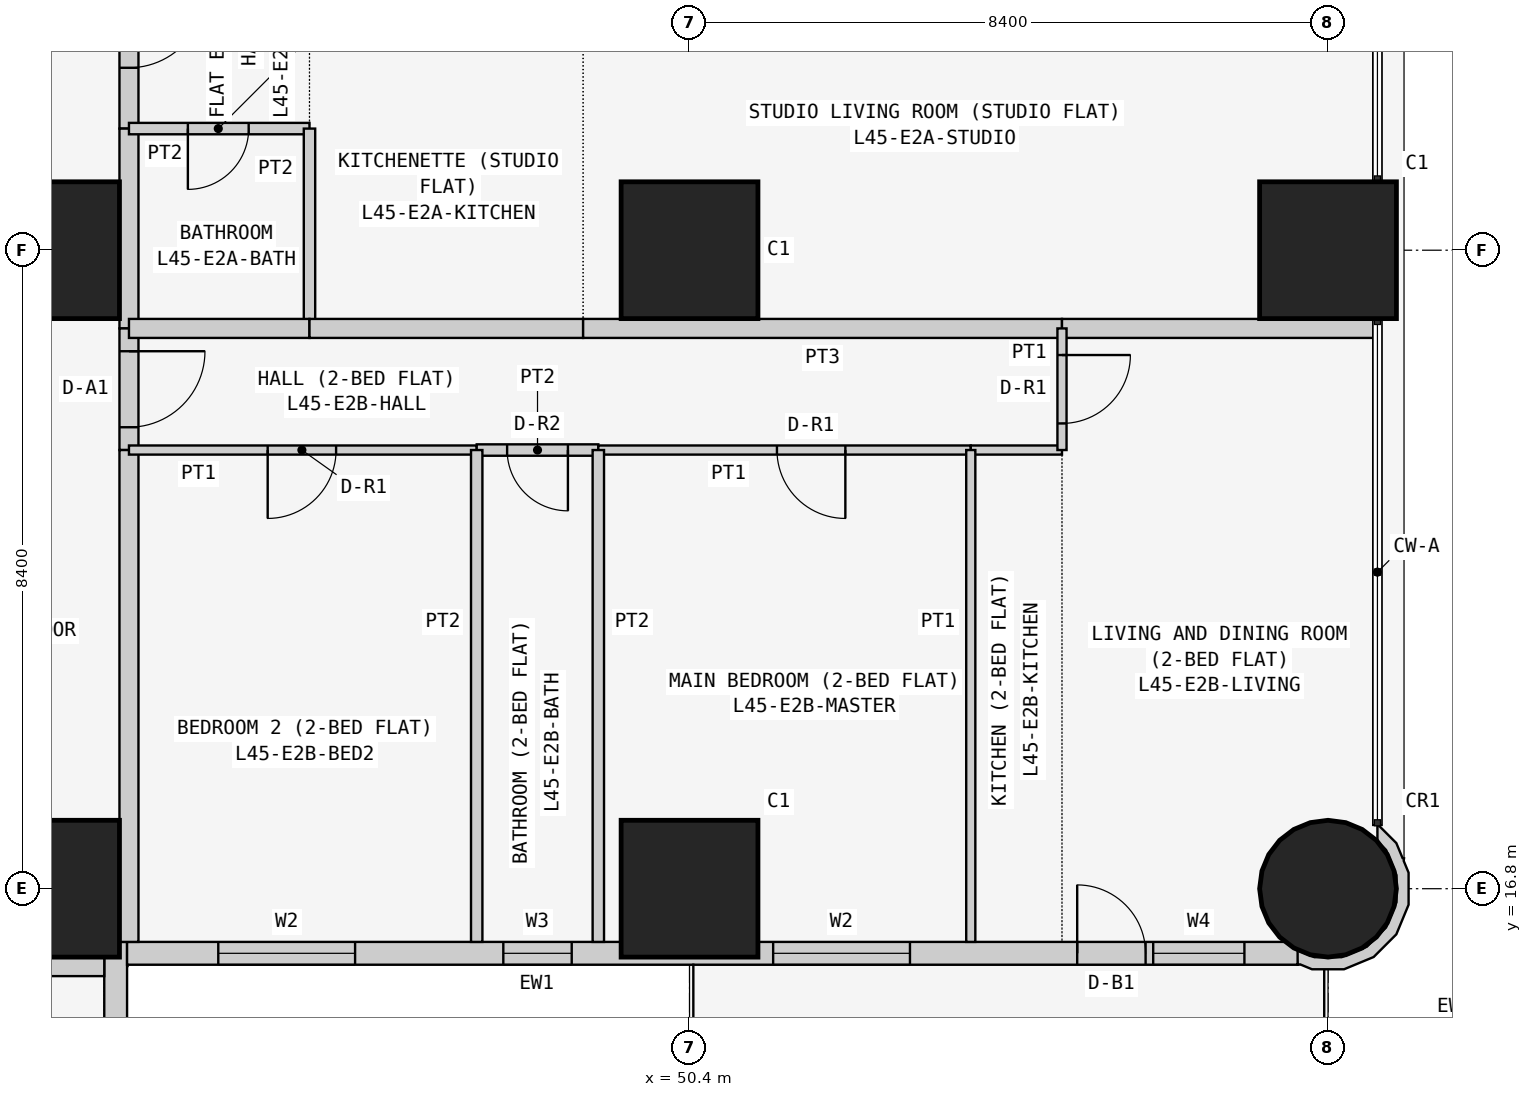
"""IFC4 building model, lengths in metres.
Left out: names, types, materials, properties, quantities, classifications, styles, units other than length and angle.
Written with IfcOpenShell. Run it as: python <this file> out.ifc"""

import sys

from ifc_helpers import new_model, si_unit, direction, frame, frame_2d, origin, origin_2d, place, context, subcontext, project, spatial, polyline, rectangle, circle, outline, extrude, element, fill, save


model = new_model("IFC4")
c1 = context("Model", 3, precision=1e-05, world=origin(), true_north=direction((0.0, 1.0)))
c2 = subcontext(c1, "Body", "Model", "MODEL_VIEW")
j1 = project(units=[si_unit("LENGTHUNIT", "METRE"), si_unit("PLANEANGLEUNIT", "RADIAN")], contexts=[c1])
p1 = place(None, origin())
s1 = spatial("IfcSite", under=j1, at=p1, CompositionType="ELEMENT")
p2 = place(p1, origin())
s2 = spatial("IfcBuilding", under=s1, at=p2, CompositionType="ELEMENT")
p3 = place(p2, frame((0.0, 0.0, 173.7)))
s3 = spatial("IfcBuildingStorey", under=s2, at=p3, CompositionType="ELEMENT", Elevation=173.7)
for number, where, z_axis, x_axis in (
    (1, (42.0, 16.8, 0.0), (0.0, 0.0, 1.0), (1.0, 0.0, 0.0)),
    (2, (42.0, 25.2, 0.0), (0.0, 0.0, 1.0), (1.0, 0.0, 0.0)),
    (3, (50.4, 16.8, 0.0), (0.0, 0.0, 1.0), (1.0, 0.0, 0.0)),
    (4, (50.4, 25.2, 0.0), (0.0, 0.0, 1.0), (1.0, 0.0, 0.0)),
):
    element("IfcColumn", number, at=place(p3, frame(where, z_axis=z_axis, x_axis=x_axis)), inside=s3, PredefinedType="COLUMN", context=c2, shape_type="SweptSolid", body=[
        extrude(rectangle(XDim=1.8, YDim=1.8, at=origin_2d()), origin(), (0.0, 0.0, 1.0), 3.6),
    ])
p4 = place(p3, frame((58.8, 16.8, 0.0), z_axis=(0.0, 0.0, 1.0), x_axis=(1.0, 0.0, 0.0)))
e5 = element("IfcColumn", 5, at=p4, inside=s3, PredefinedType="COLUMN", context=c2, shape_type="SweptSolid", body=[
    extrude(circle(Radius=0.9, at=origin_2d()), origin(), (0.0, 0.0, 1.0), 3.6),
])
p5 = place(p3, frame((58.8, 25.2, 0.0), z_axis=(0.0, 0.0, 1.0), x_axis=(1.0, 0.0, 0.0)))
e6 = element("IfcColumn", 6, at=p5, inside=s3, PredefinedType="COLUMN", context=c2, shape_type="SweptSolid", body=[
    extrude(rectangle(XDim=1.8, YDim=1.8, at=origin_2d()), origin(), (0.0, 0.0, 1.0), 3.6),
])
p6 = place(p3, frame((42.85, 8.8, 0.0), z_axis=(0.0, 0.0, 1.0), x_axis=(0.0, 1.0, 0.0)))
e7 = element("IfcWall", 7, at=p6, inside=s3, PredefinedType="SOLIDWALL", context=c2, shape_type="SweptSolid", body=[
    extrude(rectangle(XDim=7.3, YDim=0.3, at=frame_2d((3.65, 0.0))), origin(), (0.0, 0.0, 1.0), 3.35),
])
p7 = place(p6, frame((3.1, 0.0, 0.9)))
e8 = element("IfcOpeningElement", 8, at=p7, cuts=e7, PredefinedType="OPENING", context=c2, shape_type="SweptSolid", body=[
    extrude(rectangle(XDim=2.4, YDim=1.5, at=frame_2d((1.2, 0.75))), frame((0.0, 0.16, 0.0), z_axis=(0.0, -1.0, 0.0), x_axis=(1.0, 0.0, 0.0)), (0.0, 0.0, 1.0), 0.32),
])
p8 = place(p6, frame((0.75, 0.0, 0.9)))
e9 = element("IfcOpeningElement", 9, at=p8, cuts=e7, PredefinedType="OPENING", context=c2, shape_type="SweptSolid", body=[
    extrude(rectangle(XDim=1.2, YDim=1.5, at=frame_2d((0.6, 0.75))), frame((0.0, 0.16, 0.0), z_axis=(0.0, -1.0, 0.0), x_axis=(1.0, 0.0, 0.0)), (0.0, 0.0, 1.0), 0.32),
])
p9 = place(p3, frame((43.0, 15.95, 0.0), z_axis=(0.0, 0.0, 1.0), x_axis=(1.0, 0.0, 0.0)))
e10 = element("IfcWall", 10, at=p9, inside=s3, PredefinedType="SOLIDWALL", context=c2, shape_type="SweptSolid", body=[
    extrude(rectangle(XDim=15.4, YDim=0.3, at=frame_2d((7.7, 0.0))), origin(), (0.0, 0.0, 1.0), 3.35),
])
p10 = place(p9, frame((1.2, 0.0, 0.9)))
e11 = element("IfcOpeningElement", 11, at=p10, cuts=e10, PredefinedType="OPENING", context=c2, shape_type="SweptSolid", body=[
    extrude(rectangle(XDim=1.8, YDim=1.5, at=frame_2d((0.9, 0.75))), frame((0.0, 0.16, 0.0), z_axis=(0.0, -1.0, 0.0), x_axis=(1.0, 0.0, 0.0)), (0.0, 0.0, 1.0), 0.32),
])
p11 = place(p9, frame((4.95, 0.0, 1.5)))
e12 = element("IfcOpeningElement", 12, at=p11, cuts=e10, PredefinedType="OPENING", context=c2, shape_type="SweptSolid", body=[
    extrude(rectangle(XDim=0.9, YDim=0.7, at=frame_2d((0.45, 0.35))), frame((0.0, 0.16, 0.0), z_axis=(0.0, -1.0, 0.0), x_axis=(1.0, 0.0, 0.0)), (0.0, 0.0, 1.0), 0.32),
])
p12 = place(p9, frame((8.5, 0.0, 0.9)))
e13 = element("IfcOpeningElement", 13, at=p12, cuts=e10, PredefinedType="OPENING", context=c2, shape_type="SweptSolid", body=[
    extrude(rectangle(XDim=1.8, YDim=1.5, at=frame_2d((0.9, 0.75))), frame((0.0, 0.16, 0.0), z_axis=(0.0, -1.0, 0.0), x_axis=(1.0, 0.0, 0.0)), (0.0, 0.0, 1.0), 0.32),
])
p13 = place(p9, frame((12.5, 0.0, 0.0)))
e14 = element("IfcOpeningElement", 14, at=p13, cuts=e10, PredefinedType="OPENING", context=c2, shape_type="SweptSolid", body=[
    extrude(rectangle(XDim=0.9, YDim=2.4, at=frame_2d((0.45, 1.2))), frame((0.0, 0.16, 0.0), z_axis=(0.0, -1.0, 0.0), x_axis=(1.0, 0.0, 0.0)), (0.0, 0.0, 1.0), 0.32),
])
p14 = place(p9, frame((13.5, 0.0, 0.9)))
e15 = element("IfcOpeningElement", 15, at=p14, cuts=e10, PredefinedType="OPENING", context=c2, shape_type="SweptSolid", body=[
    extrude(rectangle(XDim=1.2, YDim=1.5, at=frame_2d((0.6, 0.75))), frame((0.0, 0.16, 0.0), z_axis=(0.0, -1.0, 0.0), x_axis=(1.0, 0.0, 0.0)), (0.0, 0.0, 1.0), 0.32),
])
p15 = place(p3, frame((58.436, 15.89, 0.0), z_axis=(0.0, 0.0, 1.0), x_axis=(0.926129809145, -0.377204953059, 0.0)))
e16 = element("IfcWall", 16, at=p15, inside=s3, PredefinedType="SOLIDWALL", context=c2, shape_type="SweptSolid", body=[
    extrude(outline(polyline([(0.769, 1.728), (0.75, 1.723), (0.6, 1.875), (0.295, 2.004), (0.281, 1.998), (0.36, 1.803), (0.509, 1.741), (0.761, 1.486), (0.896, 1.154), (0.894, 0.795), (0.755, 0.465), (0.5, 0.213), (0.168, 0.078), (-0.1, 0.08), (0.0, -0.097), (0.03, -0.08), (0.198, -0.081), (0.589, 0.078), (0.889, 0.374), (1.052, 0.763), (1.055, 1.185), (0.896, 1.575), (0.778, 1.695), (0.769, 1.728)])), origin(), (0.0, 0.0, 1.0), 3.35),
])
p16 = place(p3, frame((43.025, 29.4, 0.0), z_axis=(0.0, 0.0, 1.0), x_axis=(0.0, -1.0, 0.0)))
e17 = element("IfcWall", 17, at=p16, inside=s3, PredefinedType="PARTITIONING", context=c2, shape_type="SweptSolid", body=[
    extrude(rectangle(XDim=2.6, YDim=0.25, at=frame_2d((1.3, 0.0))), origin(), (0.0, 0.0, 1.0), 3.35),
])
p17 = place(p16, frame((0.8, 0.0, 0.0)))
e18 = element("IfcOpeningElement", 18, at=p17, cuts=e17, PredefinedType="OPENING", context=c2, shape_type="SweptSolid", body=[
    extrude(rectangle(XDim=1.0, YDim=2.1, at=frame_2d((0.5, 1.05))), frame((0.0, 0.135, 0.0), z_axis=(0.0, -1.0, 0.0), x_axis=(1.0, 0.0, 0.0)), (0.0, 0.0, 1.0), 0.27),
])
p18 = place(p3, frame((43.025, 26.8, 0.0), z_axis=(0.0, 0.0, 1.0), x_axis=(0.0, -1.0, 0.0)))
e19 = element("IfcWall", 19, at=p18, inside=s3, PredefinedType="PARTITIONING", context=c2, shape_type="SweptSolid", body=[
    extrude(rectangle(XDim=2.629, YDim=0.25, at=frame_2d((1.314, 0.0))), origin(), (0.0, 0.0, 1.0), 3.35),
])
p19 = place(p3, frame((43.025, 24.171, 0.0), z_axis=(0.0, 0.0, 1.0), x_axis=(0.0, -1.0, 0.0)))
e20 = element("IfcWall", 20, at=p19, inside=s3, PredefinedType="PARTITIONING", context=c2, shape_type="SweptSolid", body=[
    extrude(rectangle(XDim=1.6, YDim=0.25, at=frame_2d((0.8, 0.0))), origin(), (0.0, 0.0, 1.0), 3.35),
])
p20 = place(p19, frame((0.3, 0.0, 0.0)))
e21 = element("IfcOpeningElement", 21, at=p20, cuts=e20, PredefinedType="OPENING", context=c2, shape_type="SweptSolid", body=[
    extrude(rectangle(XDim=1.0, YDim=2.1, at=frame_2d((0.5, 1.05))), frame((0.0, 0.135, 0.0), z_axis=(0.0, -1.0, 0.0), x_axis=(1.0, 0.0, 0.0)), (0.0, 0.0, 1.0), 0.27),
])
p21 = place(p3, frame((43.025, 22.571, 0.0), z_axis=(0.0, 0.0, 1.0), x_axis=(0.0, -1.0, 0.0)))
e22 = element("IfcWall", 22, at=p21, inside=s3, PredefinedType="PARTITIONING", context=c2, shape_type="SweptSolid", body=[
    extrude(rectangle(XDim=6.471, YDim=0.25, at=frame_2d((3.235, 0.0))), origin(), (0.0, 0.0, 1.0), 3.35),
])
p22 = place(p3, frame((42.7, 15.775, 0.0), z_axis=(0.0, 0.0, 1.0), x_axis=(-1.0, 0.0, 0.0)))
e23 = element("IfcWall", 23, at=p22, inside=s3, PredefinedType="PARTITIONING", context=c2, shape_type="SweptSolid", body=[
    extrude(rectangle(XDim=6.871, YDim=0.25, at=frame_2d((3.436, 0.0))), origin(), (0.0, 0.0, 1.0), 3.35),
])
p23 = place(p3, frame((45.4, 26.8, 0.0), z_axis=(0.0, 0.0, 1.0), x_axis=(-1.0, 0.0, 0.0)))
e24 = element("IfcWall", 24, at=p23, inside=s3, PredefinedType="PARTITIONING", context=c2, shape_type="SweptSolid", body=[
    extrude(rectangle(XDim=2.375, YDim=0.15, at=frame_2d((1.188, 0.0))), origin(), (0.0, 0.0, 1.0), 3.35),
])
p24 = place(p23, frame((0.8, 0.0, 0.0)))
e25 = element("IfcOpeningElement", 25, at=p24, cuts=e24, PredefinedType="OPENING", context=c2, shape_type="SweptSolid", body=[
    extrude(rectangle(XDim=0.8, YDim=2.1, at=frame_2d((0.4, 1.05))), frame((0.0, 0.085, 0.0), z_axis=(0.0, -1.0, 0.0), x_axis=(1.0, 0.0, 0.0)), (0.0, 0.0, 1.0), 0.17),
])
p25 = place(p3, frame((45.4, 26.8, 0.0), z_axis=(0.0, 0.0, 1.0), x_axis=(0.0, -1.0, 0.0)))
e26 = element("IfcWall", 26, at=p25, inside=s3, PredefinedType="PARTITIONING", context=c2, shape_type="SweptSolid", body=[
    extrude(rectangle(XDim=2.629, YDim=0.15, at=frame_2d((1.314, 0.0))), origin(), (0.0, 0.0, 1.0), 3.35),
])
p26 = place(p3, frame((45.4, 24.171, 0.0), z_axis=(0.0, 0.0, 1.0), x_axis=(-1.0, 0.0, 0.0)))
e27 = element("IfcWall", 27, at=p26, inside=s3, PredefinedType="PARTITIONING", context=c2, shape_type="SweptSolid", body=[
    extrude(rectangle(XDim=2.375, YDim=0.25, at=frame_2d((1.188, 0.0))), origin(), (0.0, 0.0, 1.0), 3.35),
])
p27 = place(p3, frame((49.0, 24.171, 0.0), z_axis=(0.0, 0.0, 1.0), x_axis=(-1.0, 0.0, 0.0)))
e28 = element("IfcWall", 28, at=p27, inside=s3, PredefinedType="PARTITIONING", context=c2, shape_type="SweptSolid", body=[
    extrude(rectangle(XDim=3.6, YDim=0.25, at=frame_2d((1.8, 0.0))), origin(), (0.0, 0.0, 1.0), 3.35),
])
p28 = place(p3, frame((55.3, 24.171, 0.0), z_axis=(0.0, 0.0, 1.0), x_axis=(-1.0, 0.0, 0.0)))
e29 = element("IfcWall", 29, at=p28, inside=s3, PredefinedType="PARTITIONING", context=c2, shape_type="SweptSolid", body=[
    extrude(rectangle(XDim=6.3, YDim=0.25, at=frame_2d((3.15, 0.0))), origin(), (0.0, 0.0, 1.0), 3.35),
])
p29 = place(p3, frame((59.45, 24.171, 0.0), z_axis=(0.0, 0.0, 1.0), x_axis=(-1.0, 0.0, 0.0)))
e30 = element("IfcWall", 30, at=p29, inside=s3, PredefinedType="PARTITIONING", context=c2, shape_type="SweptSolid", body=[
    extrude(rectangle(XDim=4.15, YDim=0.25, at=frame_2d((2.075, 0.0))), origin(), (0.0, 0.0, 1.0), 3.35),
])
p30 = place(p3, frame((47.6, 22.571, 0.0), z_axis=(0.0, 0.0, 1.0), x_axis=(-1.0, 0.0, 0.0)))
e31 = element("IfcWall", 31, at=p30, inside=s3, PredefinedType="PARTITIONING", context=c2, shape_type="SweptSolid", body=[
    extrude(rectangle(XDim=4.575, YDim=0.12, at=frame_2d((2.288, 0.0))), origin(), (0.0, 0.0, 1.0), 3.35),
])
p31 = place(p30, frame((1.85, 0.0, 0.0)))
e32 = element("IfcOpeningElement", 32, at=p31, cuts=e31, PredefinedType="OPENING", context=c2, shape_type="SweptSolid", body=[
    extrude(rectangle(XDim=0.9, YDim=2.1, at=frame_2d((0.45, 1.05))), frame((0.0, 0.07, 0.0), z_axis=(0.0, -1.0, 0.0), x_axis=(1.0, 0.0, 0.0)), (0.0, 0.0, 1.0), 0.14),
])
p32 = place(p3, frame((49.2, 22.571, 0.0), z_axis=(0.0, 0.0, 1.0), x_axis=(-1.0, 0.0, 0.0)))
e33 = element("IfcWall", 33, at=p32, inside=s3, PredefinedType="PARTITIONING", context=c2, shape_type="SweptSolid", body=[
    extrude(rectangle(XDim=1.6, YDim=0.15, at=frame_2d((0.8, 0.0))), origin(), (0.0, 0.0, 1.0), 3.35),
])
p33 = place(p32, frame((0.4, 0.0, 0.0)))
e34 = element("IfcOpeningElement", 34, at=p33, cuts=e33, PredefinedType="OPENING", context=c2, shape_type="SweptSolid", body=[
    extrude(rectangle(XDim=0.8, YDim=2.1, at=frame_2d((0.4, 1.05))), frame((0.0, 0.085, 0.0), z_axis=(0.0, -1.0, 0.0), x_axis=(1.0, 0.0, 0.0)), (0.0, 0.0, 1.0), 0.17),
])
p34 = place(p3, frame((54.1, 22.571, 0.0), z_axis=(0.0, 0.0, 1.0), x_axis=(-1.0, 0.0, 0.0)))
e35 = element("IfcWall", 35, at=p34, inside=s3, PredefinedType="PARTITIONING", context=c2, shape_type="SweptSolid", body=[
    extrude(rectangle(XDim=4.9, YDim=0.12, at=frame_2d((2.45, 0.0))), origin(), (0.0, 0.0, 1.0), 3.35),
])
p35 = place(p34, frame((1.65, 0.0, 0.0)))
e36 = element("IfcOpeningElement", 36, at=p35, cuts=e35, PredefinedType="OPENING", context=c2, shape_type="SweptSolid", body=[
    extrude(rectangle(XDim=0.9, YDim=2.1, at=frame_2d((0.45, 1.05))), frame((0.0, 0.07, 0.0), z_axis=(0.0, -1.0, 0.0), x_axis=(1.0, 0.0, 0.0)), (0.0, 0.0, 1.0), 0.14),
])
p36 = place(p3, frame((55.3, 22.571, 0.0), z_axis=(0.0, 0.0, 1.0), x_axis=(-1.0, 0.0, 0.0)))
e37 = element("IfcWall", 37, at=p36, inside=s3, PredefinedType="PARTITIONING", context=c2, shape_type="SweptSolid", body=[
    extrude(rectangle(XDim=1.2, YDim=0.12, at=frame_2d((0.6, 0.0))), origin(), (0.0, 0.0, 1.0), 3.35),
])
p37 = place(p3, frame((55.3, 24.171, 0.0), z_axis=(0.0, 0.0, 1.0), x_axis=(0.0, -1.0, 0.0)))
e38 = element("IfcWall", 38, at=p37, inside=s3, PredefinedType="PARTITIONING", context=c2, shape_type="SweptSolid", body=[
    extrude(rectangle(XDim=1.6, YDim=0.12, at=frame_2d((0.8, 0.0))), origin(), (0.0, 0.0, 1.0), 3.35),
])
p38 = place(p37, frame((0.35, 0.0, 0.0)))
e39 = element("IfcOpeningElement", 39, at=p38, cuts=e38, PredefinedType="OPENING", context=c2, shape_type="SweptSolid", body=[
    extrude(rectangle(XDim=0.9, YDim=2.1, at=frame_2d((0.45, 1.05))), frame((0.0, 0.07, 0.0), z_axis=(0.0, -1.0, 0.0), x_axis=(1.0, 0.0, 0.0)), (0.0, 0.0, 1.0), 0.14),
])
for number, where, z_axis, x_axis in (
    (40, (47.6, 22.571, 0.0), (0.0, 0.0, 1.0), (0.0, -1.0, 0.0)),
    (41, (49.2, 22.571, 0.0), (0.0, 0.0, 1.0), (0.0, -1.0, 0.0)),
):
    element("IfcWall", number, at=place(p3, frame(where, z_axis=z_axis, x_axis=x_axis)), inside=s3, PredefinedType="PARTITIONING", context=c2, shape_type="SweptSolid", body=[
        extrude(rectangle(XDim=6.471, YDim=0.15, at=frame_2d((3.235, 0.0))), origin(), (0.0, 0.0, 1.0), 3.35),
    ])
p39 = place(p3, frame((54.1, 22.571, 0.0), z_axis=(0.0, 0.0, 1.0), x_axis=(0.0, -1.0, 0.0)))
e42 = element("IfcWall", 42, at=p39, inside=s3, PredefinedType="PARTITIONING", context=c2, shape_type="SweptSolid", body=[
    extrude(rectangle(XDim=6.471, YDim=0.12, at=frame_2d((3.235, 0.0))), origin(), (0.0, 0.0, 1.0), 3.35),
])
p40 = place(p10, origin())
e43 = element("IfcWindow", 43, at=p40, inside=s3, PartitioningType="SINGLE_PANEL", PredefinedType="WINDOW", context=c2, shape_type="SweptSolid", body=[
    extrude(rectangle(XDim=1.8, YDim=1.5, at=frame_2d((0.9, 0.75))), frame((0.0, 0.03, 0.0), z_axis=(0.0, -1.0, 0.0), x_axis=(1.0, 0.0, 0.0)), (0.0, 0.0, 1.0), 0.06),
])
fill(e11, e43)
p41 = place(p11, origin())
e44 = element("IfcWindow", 44, at=p41, inside=s3, PartitioningType="SINGLE_PANEL", PredefinedType="WINDOW", context=c2, shape_type="SweptSolid", body=[
    extrude(rectangle(XDim=0.9, YDim=0.7, at=frame_2d((0.45, 0.35))), frame((0.0, 0.03, 0.0), z_axis=(0.0, -1.0, 0.0), x_axis=(1.0, 0.0, 0.0)), (0.0, 0.0, 1.0), 0.06),
])
fill(e12, e44)
p42 = place(p12, origin())
e45 = element("IfcWindow", 45, at=p42, inside=s3, PartitioningType="SINGLE_PANEL", PredefinedType="WINDOW", context=c2, shape_type="SweptSolid", body=[
    extrude(rectangle(XDim=1.8, YDim=1.5, at=frame_2d((0.9, 0.75))), frame((0.0, 0.03, 0.0), z_axis=(0.0, -1.0, 0.0), x_axis=(1.0, 0.0, 0.0)), (0.0, 0.0, 1.0), 0.06),
])
fill(e13, e45)
p43 = place(p13, origin())
e46 = element("IfcDoor", 46, at=p43, inside=s3, OperationType="SINGLE_SWING_LEFT", PredefinedType="DOOR", context=c2, shape_type="SweptSolid", body=[
    extrude(rectangle(XDim=0.9, YDim=2.4, at=frame_2d((0.45, 1.2))), frame((0.0, 0.025, 0.0), z_axis=(0.0, -1.0, 0.0), x_axis=(1.0, 0.0, 0.0)), (0.0, 0.0, 1.0), 0.05),
])
fill(e14, e46)
p44 = place(p14, origin())
e47 = element("IfcWindow", 47, at=p44, inside=s3, PartitioningType="SINGLE_PANEL", PredefinedType="WINDOW", context=c2, shape_type="SweptSolid", body=[
    extrude(rectangle(XDim=1.2, YDim=1.5, at=frame_2d((0.6, 0.75))), frame((0.0, 0.03, 0.0), z_axis=(0.0, -1.0, 0.0), x_axis=(1.0, 0.0, 0.0)), (0.0, 0.0, 1.0), 0.06),
])
fill(e15, e47)
p45 = place(p17, origin())
e48 = element("IfcDoor", 48, at=p45, inside=s3, OperationType="SINGLE_SWING_LEFT", PredefinedType="DOOR", context=c2, shape_type="SweptSolid", body=[
    extrude(rectangle(XDim=1.0, YDim=2.1, at=frame_2d((0.5, 1.05))), frame((0.0, 0.025, 0.0), z_axis=(0.0, -1.0, 0.0), x_axis=(1.0, 0.0, 0.0)), (0.0, 0.0, 1.0), 0.05),
])
fill(e18, e48)
p46 = place(p24, origin())
e49 = element("IfcDoor", 49, at=p46, inside=s3, OperationType="SINGLE_SWING_RIGHT", PredefinedType="DOOR", context=c2, shape_type="SweptSolid", body=[
    extrude(rectangle(XDim=0.8, YDim=2.1, at=frame_2d((0.4, 1.05))), frame((0.0, 0.025, 0.0), z_axis=(0.0, -1.0, 0.0), x_axis=(1.0, 0.0, 0.0)), (0.0, 0.0, 1.0), 0.05),
])
fill(e25, e49)
p47 = place(p20, origin())
e50 = element("IfcDoor", 50, at=p47, inside=s3, OperationType="SINGLE_SWING_LEFT", PredefinedType="DOOR", context=c2, shape_type="SweptSolid", body=[
    extrude(rectangle(XDim=1.0, YDim=2.1, at=frame_2d((0.5, 1.05))), frame((0.0, 0.025, 0.0), z_axis=(0.0, -1.0, 0.0), x_axis=(1.0, 0.0, 0.0)), (0.0, 0.0, 1.0), 0.05),
])
fill(e21, e50)
p48 = place(p31, origin())
e51 = element("IfcDoor", 51, at=p48, inside=s3, OperationType="SINGLE_SWING_RIGHT", PredefinedType="DOOR", context=c2, shape_type="SweptSolid", body=[
    extrude(rectangle(XDim=0.9, YDim=2.1, at=frame_2d((0.45, 1.05))), frame((0.0, 0.025, 0.0), z_axis=(0.0, -1.0, 0.0), x_axis=(1.0, 0.0, 0.0)), (0.0, 0.0, 1.0), 0.05),
])
fill(e32, e51)
p49 = place(p33, origin())
e52 = element("IfcDoor", 52, at=p49, inside=s3, OperationType="SINGLE_SWING_LEFT", PredefinedType="DOOR", context=c2, shape_type="SweptSolid", body=[
    extrude(rectangle(XDim=0.8, YDim=2.1, at=frame_2d((0.4, 1.05))), frame((0.0, 0.025, 0.0), z_axis=(0.0, -1.0, 0.0), x_axis=(1.0, 0.0, 0.0)), (0.0, 0.0, 1.0), 0.05),
])
fill(e34, e52)
p50 = place(p35, origin())
e53 = element("IfcDoor", 53, at=p50, inside=s3, OperationType="SINGLE_SWING_LEFT", PredefinedType="DOOR", context=c2, shape_type="SweptSolid", body=[
    extrude(rectangle(XDim=0.9, YDim=2.1, at=frame_2d((0.45, 1.05))), frame((0.0, 0.025, 0.0), z_axis=(0.0, -1.0, 0.0), x_axis=(1.0, 0.0, 0.0)), (0.0, 0.0, 1.0), 0.05),
])
fill(e36, e53)
p51 = place(p38, origin())
e54 = element("IfcDoor", 54, at=p51, inside=s3, OperationType="SINGLE_SWING_LEFT", PredefinedType="DOOR", context=c2, shape_type="SweptSolid", body=[
    extrude(rectangle(XDim=0.9, YDim=2.1, at=frame_2d((0.45, 1.05))), frame((0.0, 0.025, 0.0), z_axis=(0.0, -1.0, 0.0), x_axis=(1.0, 0.0, 0.0)), (0.0, 0.0, 1.0), 0.05),
])
fill(e39, e54)
save(model, sys.argv[1])
